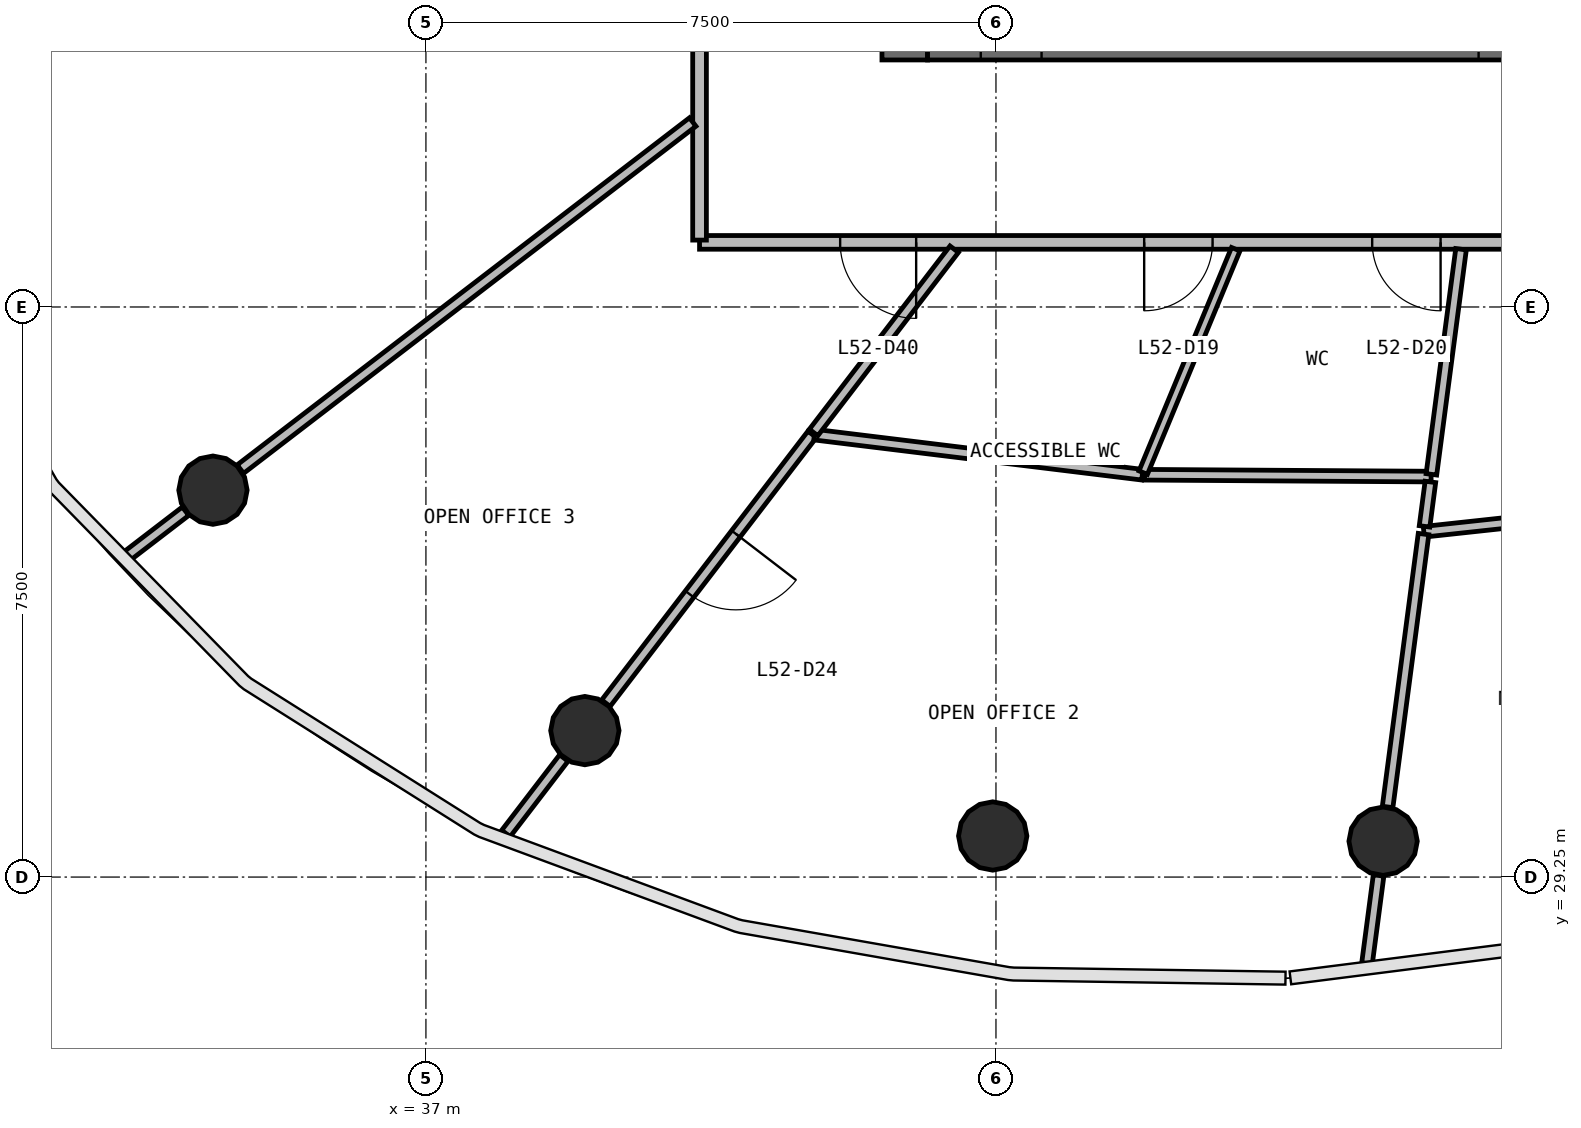
"""IFC4 building model, lengths in metres.
Left out: names, types, materials, properties, quantities, classifications, styles, units other than length and angle.
Written with IfcOpenShell. Run it as: python <this file> out.ifc"""

import sys

from ifc_helpers import new_model, si_unit, direction, frame, frame_2d, origin, origin_2d, place, context, subcontext, project, spatial, rectangle, circle, extrude, source, transform, mapped, element, fill, save


model = new_model("IFC4")
c1 = context("Model", 3, precision=1e-05, world=origin(), true_north=direction((0.0, 1.0)))
c2 = subcontext(c1, "Body", "Model", "MODEL_VIEW")
j1 = project(units=[si_unit("LENGTHUNIT", "METRE"), si_unit("PLANEANGLEUNIT", "RADIAN")], contexts=[c1])
p1 = place(None, origin())
s1 = spatial("IfcSite", under=j1, at=p1, CompositionType="ELEMENT")
p2 = place(p1, origin())
s2 = spatial("IfcBuilding", under=s1, at=p2, CompositionType="ELEMENT")
p3 = place(p2, frame((0.0, 0.0, 215.0)))
s3 = spatial("IfcBuildingStorey", under=s2, at=p3, CompositionType="ELEMENT", Elevation=215.0)
p4 = place(p3, frame((43.3, 56.0, 0.0), z_axis=(0.0, 0.0, 1.0), x_axis=(0.0, -1.0, 0.0)))
e1 = element("IfcWall", 1, at=p4, inside=s3, PredefinedType="SHEAR", context=c2, shape_type="SweptSolid", body=[
    extrude(rectangle(XDim=16.0, YDim=0.6, at=frame_2d((8.0, 0.0))), origin(), (0.0, 0.0, 1.0), 3.9),
])
p5 = place(p4, frame((7.1, 0.0, 0.0)))
e2 = element("IfcOpeningElement", 2, at=p5, cuts=e1, PredefinedType="OPENING", context=c2, shape_type="SweptSolid", body=[
    extrude(rectangle(XDim=1.8, YDim=2.1, at=frame_2d((0.9, 1.05))), frame((0.0, 0.31, 0.0), z_axis=(0.0, -1.0, 0.0), x_axis=(1.0, 0.0, 0.0)), (0.0, 0.0, 1.0), 0.62),
])
p6 = place(p3, frame((43.6, 40.3, 0.0), z_axis=(0.0, 0.0, 1.0), x_axis=(1.0, 0.0, 0.0)))
e3 = element("IfcWall", 3, at=p6, inside=s3, PredefinedType="SHEAR", context=c2, shape_type="SweptSolid", body=[
    extrude(rectangle(XDim=16.8, YDim=0.6, at=frame_2d((8.4, 0.0))), origin(), (0.0, 0.0, 1.0), 3.9),
])
p7 = place(p6, frame((10.3, 0.0, 0.0)))
e4 = element("IfcOpeningElement", 4, at=p7, cuts=e3, PredefinedType="OPENING", context=c2, shape_type="SweptSolid", body=[
    extrude(rectangle(XDim=1.2, YDim=2.1, at=frame_2d((0.6, 1.05))), frame((0.0, 0.31, 0.0), z_axis=(0.0, -1.0, 0.0), x_axis=(1.0, 0.0, 0.0)), (0.0, 0.0, 1.0), 0.62),
])
p8 = place(p6, frame((7.25, 0.0, 0.0)))
e5 = element("IfcOpeningElement", 5, at=p8, cuts=e3, PredefinedType="OPENING", context=c2, shape_type="SweptSolid", body=[
    extrude(rectangle(XDim=1.1, YDim=2.1, at=frame_2d((0.55, 1.05))), frame((0.0, 0.31, 0.0), z_axis=(0.0, -1.0, 0.0), x_axis=(1.0, 0.0, 0.0)), (0.0, 0.0, 1.0), 0.62),
])
p9 = place(p6, frame((0.7, 0.0, 0.0)))
e6 = element("IfcOpeningElement", 6, at=p9, cuts=e3, PredefinedType="OPENING", context=c2, shape_type="SweptSolid", body=[
    extrude(rectangle(XDim=0.8, YDim=2.1, at=frame_2d((0.4, 1.05))), frame((0.0, 0.31, 0.0), z_axis=(0.0, -1.0, 0.0), x_axis=(1.0, 0.0, 0.0)), (0.0, 0.0, 1.0), 0.62),
])
m1 = source(origin(), c2, "Body", "SweptSolid", [
    extrude(circle(Radius=0.45, at=origin_2d()), origin(), (0.0, 0.0, 1.0), 3.9),
])
for number, where, z_axis, x_axis in (
    (7, (34.198, 34.34, 0.0), (0.0, 0.0, 1.0), (1.0, 0.0, 0.0)),
    (8, (39.091, 31.177, 0.0), (0.0, 0.0, 1.0), (1.0, 0.0, 0.0)),
    (9, (44.457, 29.79, 0.0), (0.0, 0.0, 1.0), (1.0, 0.0, 0.0)),
    (10, (49.594, 29.722, 0.0), (0.0, 0.0, 1.0), (1.0, 0.0, 0.0)),
):
    element("IfcColumn", number, at=place(p3, frame(where, z_axis=z_axis, x_axis=x_axis)), inside=s3, PredefinedType="COLUMN", context=c2, shape_type="MappedRepresentation", body=[
        mapped(m1, transform((0.0, 0.0, 0.0), scale=1.0)),
    ])
p10 = place(p3, frame((63.4, 37.6, 0.0), z_axis=(0.0, 0.0, 1.0), x_axis=(-1.0, 0.0, 0.0)))
e11 = element("IfcWall", 11, at=p10, inside=s3, PredefinedType="PARTITIONING", context=c2, shape_type="SweptSolid", body=[
    extrude(rectangle(XDim=22.8, YDim=0.18, at=frame_2d((11.4, 0.0))), origin(), (0.0, 0.0, 1.0), 2.88),
])
p11 = place(p10, frame((16.05, 0.0, 0.0)))
e12 = element("IfcOpeningElement", 12, at=p11, cuts=e11, PredefinedType="OPENING", context=c2, shape_type="SweptSolid", body=[
    extrude(rectangle(XDim=0.9, YDim=2.1, at=frame_2d((0.45, 1.05))), frame((0.0, 0.1, 0.0), z_axis=(0.0, -1.0, 0.0), x_axis=(1.0, 0.0, 0.0)), (0.0, 0.0, 1.0), 0.2),
])
p12 = place(p10, frame((13.05, 0.0, 0.0)))
e13 = element("IfcOpeningElement", 13, at=p12, cuts=e11, PredefinedType="OPENING", context=c2, shape_type="SweptSolid", body=[
    extrude(rectangle(XDim=0.9, YDim=2.1, at=frame_2d((0.45, 1.05))), frame((0.0, 0.1, 0.0), z_axis=(0.0, -1.0, 0.0), x_axis=(1.0, 0.0, 0.0)), (0.0, 0.0, 1.0), 0.2),
])
p13 = place(p10, frame((10.95, 0.0, 0.0)))
e14 = element("IfcOpeningElement", 14, at=p13, cuts=e11, PredefinedType="OPENING", context=c2, shape_type="SweptSolid", body=[
    extrude(rectangle(XDim=1.0, YDim=2.1, at=frame_2d((0.5, 1.05))), frame((0.0, 0.1, 0.0), z_axis=(0.0, -1.0, 0.0), x_axis=(1.0, 0.0, 0.0)), (0.0, 0.0, 1.0), 0.2),
])
p14 = place(p10, frame((19.95, 0.0, 0.0)))
e15 = element("IfcOpeningElement", 15, at=p14, cuts=e11, PredefinedType="OPENING", context=c2, shape_type="SweptSolid", body=[
    extrude(rectangle(XDim=1.0, YDim=2.1, at=frame_2d((0.5, 1.05))), frame((0.0, 0.1, 0.0), z_axis=(0.0, -1.0, 0.0), x_axis=(1.0, 0.0, 0.0)), (0.0, 0.0, 1.0), 0.2),
])
p15 = place(p3, frame((40.6, 37.63, 0.0), z_axis=(0.0, 0.0, 1.0), x_axis=(0.0, 1.0, 0.0)))
e16 = element("IfcWall", 16, at=p15, inside=s3, PredefinedType="PARTITIONING", context=c2, shape_type="SweptSolid", body=[
    extrude(rectangle(XDim=20.74, YDim=0.18, at=frame_2d((10.37, 0.0))), origin(), (0.0, 0.0, 1.0), 2.88),
])
p16 = place(p15, frame((15.49, 0.0, 0.0)))
e17 = element("IfcOpeningElement", 17, at=p16, cuts=e16, PredefinedType="OPENING", context=c2, shape_type="SweptSolid", body=[
    extrude(rectangle(XDim=1.0, YDim=2.1, at=frame_2d((0.5, 1.05))), frame((0.0, 0.1, 0.0), z_axis=(0.0, -1.0, 0.0), x_axis=(1.0, 0.0, 0.0)), (0.0, 0.0, 1.0), 0.2),
])
p17 = place(p15, frame((9.89, 0.0, 0.0)))
e18 = element("IfcOpeningElement", 18, at=p17, cuts=e16, PredefinedType="OPENING", context=c2, shape_type="SweptSolid", body=[
    extrude(rectangle(XDim=1.0, YDim=2.1, at=frame_2d((0.5, 1.05))), frame((0.0, 0.1, 0.0), z_axis=(0.0, -1.0, 0.0), x_axis=(1.0, 0.0, 0.0)), (0.0, 0.0, 1.0), 0.2),
])
p18 = place(p3, frame((40.51, 39.183, 0.0), z_axis=(0.0, 0.0, 1.0), x_axis=(-0.793355383425, -0.608758766336, 0.0)))
e19 = element("IfcWall", 19, at=p18, inside=s3, PredefinedType="PARTITIONING", context=c2, shape_type="SweptSolid", body=[
    extrude(rectangle(XDim=7.501, YDim=0.14, at=frame_2d((3.751, 0.0))), origin(), (0.0, 0.0, 1.0), 2.88),
])
p19 = place(p3, frame((42.082, 35.074, 0.0), z_axis=(0.0, 0.0, 1.0), x_axis=(-0.608752257704, -0.793360377596, 0.0)))
e20 = element("IfcWall", 20, at=p19, inside=s3, PredefinedType="PARTITIONING", context=c2, shape_type="SweptSolid", body=[
    extrude(rectangle(XDim=4.458, YDim=0.14, at=frame_2d((2.229, 0.0))), origin(), (0.0, 0.0, 1.0), 2.88),
])
p20 = place(p19, frame((1.65, 0.0, 0.0)))
e21 = element("IfcOpeningElement", 21, at=p20, cuts=e20, PredefinedType="OPENING", context=c2, shape_type="SweptSolid", body=[
    extrude(rectangle(XDim=1.0, YDim=2.1, at=frame_2d((0.5, 1.05))), frame((0.0, 0.08, 0.0), z_axis=(0.0, -1.0, 0.0), x_axis=(1.0, 0.0, 0.0)), (0.0, 0.0, 1.0), 0.16),
])
p21 = place(p3, frame((42.112, 35.071, 0.0), z_axis=(0.0, 0.0, 1.0), x_axis=(0.992606150854, -0.121379690584, 0.0)))
e22 = element("IfcWall", 22, at=p21, inside=s3, PredefinedType="PARTITIONING", context=c2, shape_type="SweptSolid", body=[
    extrude(rectangle(XDim=4.347, YDim=0.14, at=frame_2d((2.173, 0.0))), origin(), (0.0, 0.0, 1.0), 2.88),
])
p22 = place(p3, frame((46.456, 34.543, 0.0), z_axis=(0.0, 0.0, 1.0), x_axis=(0.999979441631, -0.006412200578, 0.0)))
e23 = element("IfcWall", 23, at=p22, inside=s3, PredefinedType="PARTITIONING", context=c2, shape_type="SweptSolid", body=[
    extrude(rectangle(XDim=3.769, YDim=0.14, at=frame_2d((1.885, 0.0))), origin(), (0.0, 0.0, 1.0), 2.88),
])
p23 = place(p3, frame((53.818, 34.192, 0.0), z_axis=(0.0, 0.0, 1.0), x_axis=(-0.994173931983, -0.107787721776, 0.0)))
e24 = element("IfcWall", 24, at=p23, inside=s3, PredefinedType="PARTITIONING", context=c2, shape_type="SweptSolid", body=[
    extrude(rectangle(XDim=3.71, YDim=0.14, at=frame_2d((1.855, 0.0))), origin(), (0.0, 0.0, 1.0), 2.88),
])
p24 = place(p23, frame((1.26, 0.0, 0.0)))
e25 = element("IfcOpeningElement", 25, at=p24, cuts=e24, PredefinedType="OPENING", context=c2, shape_type="SweptSolid", body=[
    extrude(rectangle(XDim=1.0, YDim=2.1, at=frame_2d((0.5, 1.05))), frame((0.0, 0.08, 0.0), z_axis=(0.0, -1.0, 0.0), x_axis=(1.0, 0.0, 0.0)), (0.0, 0.0, 1.0), 0.16),
])
p25 = place(p3, frame((50.125, 33.763, 0.0), z_axis=(0.0, 0.0, 1.0), x_axis=(-0.130520782699, -0.991445573536, 0.0)))
e26 = element("IfcWall", 26, at=p25, inside=s3, PredefinedType="PARTITIONING", context=c2, shape_type="SweptSolid", body=[
    extrude(rectangle(XDim=3.621, YDim=0.14, at=frame_2d((1.811, 0.0))), origin(), (0.0, 0.0, 1.0), 2.88),
])
p26 = place(p3, frame((43.951, 37.51, 0.0), z_axis=(0.0, 0.0, 1.0), x_axis=(-0.608716498744, -0.793387814475, 0.0)))
e27 = element("IfcWall", 27, at=p26, inside=s3, PredefinedType="PARTITIONING", context=c2, shape_type="SweptSolid", body=[
    extrude(rectangle(XDim=3.039, YDim=0.14, at=frame_2d((1.52, 0.0))), origin(), (0.0, 0.0, 1.0), 2.88),
])
p27 = place(p3, frame((50.619, 37.51, 0.0), z_axis=(0.0, 0.0, 1.0), x_axis=(-0.130520050683, -0.991445669903, 0.0)))
e28 = element("IfcWall", 28, at=p27, inside=s3, PredefinedType="PARTITIONING", context=c2, shape_type="SweptSolid", body=[
    extrude(rectangle(XDim=2.987, YDim=0.14, at=frame_2d((1.494, 0.0))), origin(), (0.0, 0.0, 1.0), 2.88),
])
p28 = place(p3, frame((38.814, 30.816, 0.0), z_axis=(0.0, 0.0, 1.0), x_axis=(-0.608673156435, -0.793421066417, 0.0)))
e29 = element("IfcWall", 29, at=p28, inside=s3, PredefinedType="PARTITIONING", context=c2, shape_type="SweptSolid", body=[
    extrude(rectangle(XDim=1.251, YDim=0.14, at=frame_2d((0.626, 0.0))), origin(), (0.0, 0.0, 1.0), 2.88),
])
p29 = place(p3, frame((49.534, 29.271, 0.0), z_axis=(0.0, 0.0, 1.0), x_axis=(-0.130562588112, -0.991440069084, 0.0)))
e30 = element("IfcWall", 30, at=p29, inside=s3, PredefinedType="PARTITIONING", context=c2, shape_type="SweptSolid", body=[
    extrude(rectangle(XDim=1.169, YDim=0.14, at=frame_2d((0.584, 0.0))), origin(), (0.0, 0.0, 1.0), 2.88),
])
p30 = place(p3, frame((33.837, 34.063, 0.0), z_axis=(0.0, 0.0, 1.0), x_axis=(-0.793366099044, -0.608744801117, 0.0)))
e31 = element("IfcWall", 31, at=p30, inside=s3, PredefinedType="PARTITIONING", context=c2, shape_type="SweptSolid", body=[
    extrude(rectangle(XDim=1.014, YDim=0.14, at=frame_2d((0.507, 0.0))), origin(), (0.0, 0.0, 1.0), 2.88),
])
p31 = place(p3, frame((50.216, 34.449, 0.0), z_axis=(0.0, 0.0, 1.0), x_axis=(-0.130400969459, -0.991461339218, 0.0)))
e32 = element("IfcWall", 32, at=p31, inside=s3, PredefinedType="PARTITIONING", context=c2, shape_type="SweptSolid", body=[
    extrude(rectangle(XDim=0.59, YDim=0.14, at=frame_2d((0.295, 0.0))), origin(), (0.0, 0.0, 1.0), 2.88),
])
p32 = place(p3, frame((47.655, 37.51, 0.0), z_axis=(0.0, 0.0, 1.0), x_axis=(-0.382636460762, -0.923898987387, 0.0)))
e33 = element("IfcWall", 33, at=p32, inside=s3, PredefinedType="PARTITIONING", context=c2, shape_type="SweptSolid", body=[
    extrude(rectangle(XDim=3.181, YDim=0.12, at=frame_2d((1.591, 0.0))), origin(), (0.0, 0.0, 1.0), 2.88),
])
m2 = source(origin(), c2, "Body", "SweptSolid", [
    extrude(rectangle(XDim=0.9, YDim=2.1, at=frame_2d((0.45, 1.05))), frame((0.0, 0.025, 0.0), z_axis=(0.0, -1.0, 0.0), x_axis=(1.0, 0.0, 0.0)), (0.0, 0.0, 1.0), 0.05),
])
p33 = place(p11, origin())
e34 = element("IfcDoor", 34, at=p33, inside=s3, OperationType="SINGLE_SWING_RIGHT", PredefinedType="DOOR", context=c2, shape_type="MappedRepresentation", body=[
    mapped(m2, transform((0.0, 0.0, 0.0), scale=1.0)),
])
fill(e12, e34)
p34 = place(p12, origin())
e35 = element("IfcDoor", 35, at=p34, inside=s3, OperationType="SINGLE_SWING_LEFT", PredefinedType="DOOR", context=c2, shape_type="MappedRepresentation", body=[
    mapped(m2, transform((0.0, 0.0, 0.0), scale=1.0)),
])
fill(e13, e35)
m3 = source(origin(), c2, "Body", "SweptSolid", [
    extrude(rectangle(XDim=1.0, YDim=2.1, at=frame_2d((0.5, 1.05))), frame((0.0, 0.025, 0.0), z_axis=(0.0, -1.0, 0.0), x_axis=(1.0, 0.0, 0.0)), (0.0, 0.0, 1.0), 0.05),
])
p35 = place(p20, origin())
e36 = element("IfcDoor", 36, at=p35, inside=s3, OperationType="SINGLE_SWING_LEFT", PredefinedType="DOOR", context=c2, shape_type="MappedRepresentation", body=[
    mapped(m3, transform((0.0, 0.0, 0.0), scale=1.0)),
])
fill(e21, e36)
p36 = place(p14, origin())
e37 = element("IfcDoor", 37, at=p36, inside=s3, OperationType="SINGLE_SWING_LEFT", PredefinedType="DOOR", context=c2, shape_type="MappedRepresentation", body=[
    mapped(m3, transform((0.0, 0.0, 0.0), scale=1.0)),
])
fill(e15, e37)
save(model, sys.argv[1])
